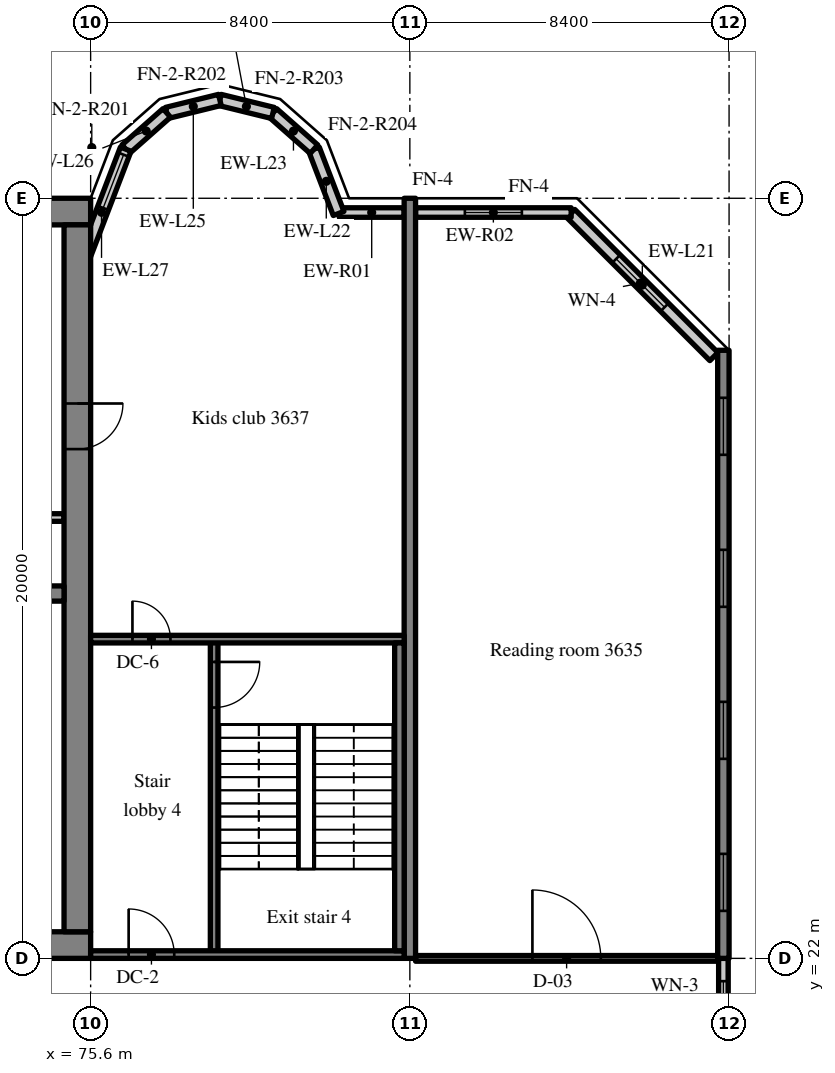
"""IFC4 building model, lengths in metres.
Left out: names, types, materials, properties, quantities, classifications, styles, units other than length and angle.
Written with IfcOpenShell. Run it as: python <this file> out.ifc"""

import sys

from ifc_helpers import new_model, si_unit, direction, frame, frame_2d, origin, place, context, subcontext, project, spatial, rectangle, extrude, source, transform, mapped, element, fill, save


model = new_model("IFC4")
c1 = context("Model", 3, precision=1e-05, world=origin(), true_north=direction((0.0, 1.0)))
c2 = subcontext(c1, "Body", "Model", "MODEL_VIEW")
j1 = project(units=[si_unit("LENGTHUNIT", "METRE"), si_unit("PLANEANGLEUNIT", "RADIAN")], contexts=[c1])
p1 = place(None, origin())
s1 = spatial("IfcSite", under=j1, at=p1, CompositionType="ELEMENT")
p2 = place(p1, origin())
s2 = spatial("IfcBuilding", under=s1, at=p2, CompositionType="ELEMENT")
p3 = place(p2, frame((0.0, 0.0, 151.6)))
s3 = spatial("IfcBuildingStorey", under=s2, at=p3, CompositionType="ELEMENT", Elevation=151.6)
m1 = source(origin(), c2, "Body", "SweptSolid", [
    extrude(rectangle(XDim=50.4, YDim=0.7, at=frame_2d((25.2, 0.0))), origin(), (0.0, 0.0, 1.0), 3.52),
])
p4 = place(p3, frame((25.2, 22.35, 0.0), z_axis=(0.0, 0.0, 1.0), x_axis=(1.0, 0.0, 0.0)))
e1 = element("IfcWall", 1, at=p4, inside=s3, PredefinedType="SHEAR", context=c2, shape_type="MappedRepresentation", body=[
    mapped(m1, transform((0.0, 0.0, 0.0), scale=1.0)),
])
m2 = source(origin(), c2, "Body", "SweptSolid", [
    extrude(rectangle(XDim=1.8, YDim=2.1, at=frame_2d((0.9, 1.05))), frame((0.0, 0.36, 0.0), z_axis=(0.0, -1.0, 0.0), x_axis=(1.0, 0.0, 0.0)), (0.0, 0.0, 1.0), 0.72),
])
p5 = place(p4, frame((15.9, 0.0, 0.0)))
e2 = element("IfcOpeningElement", 2, at=p5, cuts=e1, PredefinedType="OPENING", context=c2, shape_type="MappedRepresentation", body=[
    mapped(m2, transform((0.0, 0.0, 0.0), scale=1.0)),
])
m3 = source(origin(), c2, "Body", "SweptSolid", [
    extrude(rectangle(XDim=0.9, YDim=2.1, at=frame_2d((0.45, 1.05))), frame((0.0, 0.36, 0.0), z_axis=(0.0, -1.0, 0.0), x_axis=(1.0, 0.0, 0.0)), (0.0, 0.0, 1.0), 0.72),
])
p6 = place(p4, frame((21.5, 0.0, 0.0)))
e3 = element("IfcOpeningElement", 3, at=p6, cuts=e1, PredefinedType="OPENING", context=c2, shape_type="MappedRepresentation", body=[
    mapped(m3, transform((0.0, 0.0, 0.0), scale=1.0)),
])
p7 = place(p4, frame((32.7, 0.0, 0.0)))
e4 = element("IfcOpeningElement", 4, at=p7, cuts=e1, PredefinedType="OPENING", context=c2, shape_type="MappedRepresentation", body=[
    mapped(m2, transform((0.0, 0.0, 0.0), scale=1.0)),
])
m4 = source(origin(), c2, "Body", "SweptSolid", [
    extrude(rectangle(XDim=1.2, YDim=2.1, at=frame_2d((0.6, 1.05))), frame((0.0, 0.36, 0.0), z_axis=(0.0, -1.0, 0.0), x_axis=(1.0, 0.0, 0.0)), (0.0, 0.0, 1.0), 0.72),
])
p8 = place(p4, frame((6.475, 0.0, 0.0)))
e5 = element("IfcOpeningElement", 5, at=p8, cuts=e1, PredefinedType="OPENING", context=c2, shape_type="MappedRepresentation", body=[
    mapped(m4, transform((0.0, 0.0, 0.0), scale=1.0)),
])
p9 = place(p4, frame((47.875, 0.0, 0.0)))
e6 = element("IfcOpeningElement", 6, at=p9, cuts=e1, PredefinedType="OPENING", context=c2, shape_type="MappedRepresentation", body=[
    mapped(m4, transform((0.0, 0.0, 0.0), scale=1.0)),
])
p10 = place(p3, frame((25.2, 41.65, 0.0), z_axis=(0.0, 0.0, 1.0), x_axis=(1.0, 0.0, 0.0)))
e7 = element("IfcWall", 7, at=p10, inside=s3, PredefinedType="SHEAR", context=c2, shape_type="MappedRepresentation", body=[
    mapped(m1, transform((0.0, 0.0, 0.0), scale=1.0)),
])
m5 = source(origin(), c2, "Body", "SweptSolid", [
    extrude(rectangle(XDim=18.6, YDim=0.7, at=frame_2d((9.3, 0.0))), origin(), (0.0, 0.0, 1.0), 3.52),
])
p11 = place(p3, frame((75.25, 22.7, 0.0), z_axis=(0.0, 0.0, 1.0), x_axis=(0.0, 1.0, 0.0)))
e8 = element("IfcWall", 8, at=p11, inside=s3, PredefinedType="SHEAR", context=c2, shape_type="MappedRepresentation", body=[
    mapped(m5, transform((0.0, 0.0, 0.0), scale=1.0)),
])
p12 = place(p11, frame((12.7, 0.0, 0.0)))
e9 = element("IfcOpeningElement", 9, at=p12, cuts=e8, PredefinedType="OPENING", context=c2, shape_type="MappedRepresentation", body=[
    mapped(m4, transform((0.0, 0.0, 0.0), scale=1.0)),
])
m6 = source(origin(), c2, "Body", "SweptSolid", [
    extrude(rectangle(XDim=7.5, YDim=0.4, at=frame_2d((3.75, 0.0))), origin(), (0.0, 0.0, 1.0), 3.52),
])
p13 = place(p3, frame((67.4, 31.6, 0.0), z_axis=(0.0, 0.0, 1.0), x_axis=(1.0, 0.0, 0.0)))
e10 = element("IfcWall", 10, at=p13, inside=s3, PredefinedType="SHEAR", context=c2, shape_type="MappedRepresentation", body=[
    mapped(m6, transform((0.0, 0.0, 0.0), scale=1.0)),
])
m7 = source(origin(), c2, "Body", "SweptSolid", [
    extrude(rectangle(XDim=1.1, YDim=2.1, at=frame_2d((0.55, 1.05))), frame((0.0, 0.21, 0.0), z_axis=(0.0, -1.0, 0.0), x_axis=(1.0, 0.0, 0.0)), (0.0, 0.0, 1.0), 0.42),
])
p14 = place(p13, frame((5.725, 0.0, 0.0)))
e11 = element("IfcOpeningElement", 11, at=p14, cuts=e10, PredefinedType="OPENING", context=c2, shape_type="MappedRepresentation", body=[
    mapped(m7, transform((0.0, 0.0, 0.0), scale=1.0)),
])
m8 = source(origin(), c2, "Body", "SweptSolid", [
    extrude(rectangle(XDim=20.0, YDim=0.3, at=frame_2d((10.0, 0.0))), origin(), (0.0, 0.0, 1.0), 3.52),
])
p15 = place(p3, frame((84.0, 22.0, 0.0), z_axis=(0.0, 0.0, 1.0), x_axis=(0.0, 1.0, 0.0)))
e12 = element("IfcWall", 12, at=p15, inside=s3, PredefinedType="SHEAR", context=c2, shape_type="MappedRepresentation", body=[
    mapped(m8, transform((0.0, 0.0, 0.0), scale=1.0)),
])
m9 = source(origin(), c2, "Body", "SweptSolid", [
    extrude(rectangle(XDim=16.0, YDim=0.3, at=frame_2d((8.0, 0.0))), origin(), (0.0, 0.0, 1.0), 3.52),
])
p16 = place(p3, frame((92.25, 22.0, 0.0), z_axis=(0.0, 0.0, 1.0), x_axis=(0.0, 1.0, 0.0)))
e13 = element("IfcWall", 13, at=p16, inside=s3, PredefinedType="SHEAR", context=c2, shape_type="MappedRepresentation", body=[
    mapped(m9, transform((0.0, 0.0, 0.0), scale=1.0)),
])
m10 = source(origin(), c2, "Body", "SweptSolid", [
    extrude(rectangle(XDim=1.5, YDim=1.5, at=frame_2d((0.75, 0.75))), frame((0.0, 0.16, 0.0), z_axis=(0.0, -1.0, 0.0), x_axis=(1.0, 0.0, 0.0)), (0.0, 0.0, 1.0), 0.32),
])
p17 = place(p16, frame((1.25, 0.0, 0.9)))
e14 = element("IfcOpeningElement", 14, at=p17, cuts=e13, PredefinedType="OPENING", context=c2, shape_type="MappedRepresentation", body=[
    mapped(m10, transform((0.0, 0.0, 0.0), scale=1.0)),
])
p18 = place(p16, frame((5.25, 0.0, 0.9)))
e15 = element("IfcOpeningElement", 15, at=p18, cuts=e13, PredefinedType="OPENING", context=c2, shape_type="MappedRepresentation", body=[
    mapped(m10, transform((0.0, 0.0, 0.0), scale=1.0)),
])
p19 = place(p16, frame((9.25, 0.0, 0.9)))
e16 = element("IfcOpeningElement", 16, at=p19, cuts=e13, PredefinedType="OPENING", context=c2, shape_type="MappedRepresentation", body=[
    mapped(m10, transform((0.0, 0.0, 0.0), scale=1.0)),
])
p20 = place(p16, frame((13.25, 0.0, 0.9)))
e17 = element("IfcOpeningElement", 17, at=p20, cuts=e13, PredefinedType="OPENING", context=c2, shape_type="MappedRepresentation", body=[
    mapped(m10, transform((0.0, 0.0, 0.0), scale=1.0)),
])
m11 = source(origin(), c2, "Body", "SweptSolid", [
    extrude(rectangle(XDim=5.326, YDim=0.3, at=frame_2d((2.663, 0.0))), origin(), (0.0, 0.0, 1.0), 3.52),
])
p21 = place(p3, frame((92.0, 37.834, 0.0), z_axis=(0.0, 0.0, 1.0), x_axis=(-0.707083859269, 0.707129702361, 0.0)))
e18 = element("IfcWall", 18, at=p21, inside=s3, PredefinedType="SOLIDWALL", context=c2, shape_type="MappedRepresentation", body=[
    mapped(m11, transform((0.0, 0.0, 0.0), scale=1.0)),
])
m12 = source(origin(), c2, "Body", "SweptSolid", [
    extrude(rectangle(XDim=1.8, YDim=1.5, at=frame_2d((0.9, 0.75))), frame((0.0, 0.16, 0.0), z_axis=(0.0, -1.0, 0.0), x_axis=(1.0, 0.0, 0.0)), (0.0, 0.0, 1.0), 0.32),
])
p22 = place(p21, frame((1.836, 0.0, 0.9)))
e19 = element("IfcOpeningElement", 19, at=p22, cuts=e18, PredefinedType="OPENING", context=c2, shape_type="MappedRepresentation", body=[
    mapped(m12, transform((0.0, 0.0, 0.0), scale=1.0)),
])
m13 = source(origin(), c2, "Body", "SweptSolid", [
    extrude(rectangle(XDim=1.708, YDim=0.25, at=frame_2d((0.854, 0.0))), origin(), (0.0, 0.0, 1.0), 2.87),
])
p23 = place(p3, frame((83.85, 41.625, 0.0), z_axis=(0.0, 0.0, 1.0), x_axis=(-1.0, 0.0, 0.0)))
e20 = element("IfcWall", 20, at=p23, inside=s3, PredefinedType="SOLIDWALL", context=c2, shape_type="MappedRepresentation", body=[
    mapped(m13, transform((0.0, 0.0, 0.0), scale=1.0)),
])
m14 = source(origin(), c2, "Body", "SweptSolid", [
    extrude(rectangle(XDim=4.095, YDim=0.25, at=frame_2d((2.047, 0.0))), origin(), (0.0, 0.0, 1.0), 2.87),
])
p24 = place(p3, frame((88.245, 41.625, 0.0), z_axis=(0.0, 0.0, 1.0), x_axis=(-1.0, 0.0, 0.0)))
e21 = element("IfcWall", 21, at=p24, inside=s3, PredefinedType="SOLIDWALL", context=c2, shape_type="MappedRepresentation", body=[
    mapped(m14, transform((0.0, 0.0, 0.0), scale=1.0)),
])
m15 = source(origin(), c2, "Body", "SweptSolid", [
    extrude(rectangle(XDim=1.5, YDim=1.5, at=frame_2d((0.75, 0.75))), frame((0.0, 0.135, 0.0), z_axis=(0.0, -1.0, 0.0), x_axis=(1.0, 0.0, 0.0)), (0.0, 0.0, 1.0), 0.27),
])
p25 = place(p24, frame((1.297, 0.0, 0.9)))
e22 = element("IfcOpeningElement", 22, at=p25, cuts=e21, PredefinedType="OPENING", context=c2, shape_type="MappedRepresentation", body=[
    mapped(m15, transform((0.0, 0.0, 0.0), scale=1.0)),
])
m16 = source(origin(), c2, "Body", "SweptSolid", [
    extrude(rectangle(XDim=1.812, YDim=0.3, at=frame_2d((0.906, 0.0))), origin(), (0.0, 0.0, 1.0), 3.52),
])
p26 = place(p3, frame((82.125, 41.6, 0.0), z_axis=(0.0, 0.0, 1.0), x_axis=(-0.357877270961, 0.93376863244, 0.0)))
e23 = element("IfcWall", 23, at=p26, inside=s3, PredefinedType="SOLIDWALL", context=c2, shape_type="MappedRepresentation", body=[
    mapped(m16, transform((0.0, 0.0, 0.0), scale=1.0)),
])
m17 = source(origin(), c2, "Body", "SweptSolid", [
    extrude(rectangle(XDim=1.44, YDim=0.3, at=frame_2d((0.72, 0.0))), origin(), (0.0, 0.0, 1.0), 3.52),
])
p27 = place(p3, frame((81.477, 43.292, 0.0), z_axis=(0.0, 0.0, 1.0), x_axis=(-0.74957555648, 0.661918790432, 0.0)))
e24 = element("IfcWall", 24, at=p27, inside=s3, PredefinedType="SOLIDWALL", context=c2, shape_type="MappedRepresentation", body=[
    mapped(m17, transform((0.0, 0.0, 0.0), scale=1.0)),
])
m18 = source(origin(), c2, "Body", "SweptSolid", [
    extrude(rectangle(XDim=1.439, YDim=0.3, at=frame_2d((0.719, 0.0))), origin(), (0.0, 0.0, 1.0), 3.52),
])
for number, where, z_axis, x_axis in (
    (25, (80.397, 44.245, 0.0), (0.0, 0.0, 1.0), (-0.971, 0.238, 0.0)),
    (26, (79.0, 44.588, 0.0), (0.0, 0.0, 1.0), (-0.971, -0.238, 0.0)),
):
    element("IfcWall", number, at=place(p3, frame(where, z_axis=z_axis, x_axis=x_axis)), inside=s3, PredefinedType="SOLIDWALL", context=c2, shape_type="MappedRepresentation", body=[
        mapped(m18, transform((0.0, 0.0, 0.0), scale=1.0)),
    ])
p28 = place(p3, frame((77.603, 44.245, 0.0), z_axis=(0.0, 0.0, 1.0), x_axis=(-0.74957555648, -0.661918790432, 0.0)))
e27 = element("IfcWall", 27, at=p28, inside=s3, PredefinedType="SOLIDWALL", context=c2, shape_type="MappedRepresentation", body=[
    mapped(m17, transform((0.0, 0.0, 0.0), scale=1.0)),
])
m19 = source(origin(), c2, "Body", "SweptSolid", [
    extrude(rectangle(XDim=3.559, YDim=0.3, at=frame_2d((1.78, 0.0))), origin(), (0.0, 0.0, 1.0), 3.52),
])
p29 = place(p3, frame((76.523, 43.292, 0.0), z_axis=(0.0, 0.0, 1.0), x_axis=(-0.35779745313, -0.933799219604, 0.0)))
e28 = element("IfcWall", 28, at=p29, inside=s3, PredefinedType="SOLIDWALL", context=c2, shape_type="MappedRepresentation", body=[
    mapped(m19, transform((0.0, 0.0, 0.0), scale=1.0)),
])
m20 = source(origin(), c2, "Body", "SweptSolid", [
    extrude(rectangle(XDim=1.5, YDim=2.0, at=frame_2d((0.75, 1.0))), frame((0.0, 0.16, 0.0), z_axis=(0.0, -1.0, 0.0), x_axis=(1.0, 0.0, 0.0)), (0.0, 0.0, 1.0), 0.32),
])
p30 = place(p29, frame((0.156, 0.0, 0.9)))
e29 = element("IfcOpeningElement", 29, at=p30, cuts=e28, PredefinedType="OPENING", context=c2, shape_type="MappedRepresentation", body=[
    mapped(m20, transform((0.0, 0.0, 0.0), scale=1.0)),
])
m21 = source(origin(), c2, "Body", "SweptSolid", [
    extrude(rectangle(XDim=2.4, YDim=0.25, at=frame_2d((1.2, 0.0))), origin(), (0.0, 0.0, 1.0), 2.62),
])
p31 = place(p3, frame((92.25, 19.6, 0.0), z_axis=(0.0, 0.0, 1.0), x_axis=(0.0, 1.0, 0.0)))
e30 = element("IfcWall", 30, at=p31, inside=s3, PredefinedType="SOLIDWALL", context=c2, shape_type="MappedRepresentation", body=[
    mapped(m21, transform((0.0, 0.0, 0.0), scale=1.0)),
])
m22 = source(origin(), c2, "Body", "SweptSolid", [
    extrude(rectangle(XDim=1.2, YDim=1.5, at=frame_2d((0.6, 0.75))), frame((0.0, 0.135, 0.0), z_axis=(0.0, -1.0, 0.0), x_axis=(1.0, 0.0, 0.0)), (0.0, 0.0, 1.0), 0.27),
])
p32 = place(p31, frame((0.6, 0.0, 0.9)))
e31 = element("IfcOpeningElement", 31, at=p32, cuts=e30, PredefinedType="OPENING", context=c2, shape_type="MappedRepresentation", body=[
    mapped(m22, transform((0.0, 0.0, 0.0), scale=1.0)),
])
m23 = source(origin(), c2, "Body", "SweptSolid", [
    extrude(rectangle(XDim=2.45, YDim=0.2, at=frame_2d((1.225, 0.0))), origin(), (0.0, 0.0, 1.0), 3.52),
])
p33 = place(p3, frame((72.45, 33.6, 0.0), z_axis=(0.0, 0.0, 1.0), x_axis=(1.0, 0.0, 0.0)))
e32 = element("IfcWall", 32, at=p33, inside=s3, PredefinedType="SOLIDWALL", context=c2, shape_type="MappedRepresentation", body=[
    mapped(m23, transform((0.0, 0.0, 0.0), scale=1.0)),
])
m24 = source(origin(), c2, "Body", "SweptSolid", [
    extrude(rectangle(XDim=8.3, YDim=0.2, at=frame_2d((4.15, 0.0))), origin(), (0.0, 0.0, 1.0), 3.52),
])
p34 = place(p3, frame((78.85, 22.1, 0.0), z_axis=(0.0, 0.0, 1.0), x_axis=(0.0, 1.0, 0.0)))
e33 = element("IfcWall", 33, at=p34, inside=s3, PredefinedType="SOLIDWALL", context=c2, shape_type="MappedRepresentation", body=[
    mapped(m24, transform((0.0, 0.0, 0.0), scale=1.0)),
])
m25 = source(origin(), c2, "Body", "SweptSolid", [
    extrude(rectangle(XDim=1.2, YDim=2.1, at=frame_2d((0.6, 1.05))), frame((0.0, 0.11, 0.0), z_axis=(0.0, -1.0, 0.0), x_axis=(1.0, 0.0, 0.0)), (0.0, 0.0, 1.0), 0.22),
])
p35 = place(p34, frame((6.5, 0.0, 0.0)))
e34 = element("IfcOpeningElement", 34, at=p35, cuts=e33, PredefinedType="OPENING", context=c2, shape_type="MappedRepresentation", body=[
    mapped(m25, transform((0.0, 0.0, 0.0), scale=1.0)),
])
m26 = source(origin(), c2, "Body", "SweptSolid", [
    extrude(rectangle(XDim=8.25, YDim=0.2, at=frame_2d((4.125, 0.0))), origin(), (0.0, 0.0, 1.0), 3.52),
])
p36 = place(p3, frame((83.85, 22.1, 0.0), z_axis=(0.0, 0.0, 1.0), x_axis=(-1.0, 0.0, 0.0)))
e35 = element("IfcWall", 35, at=p36, inside=s3, PredefinedType="SOLIDWALL", context=c2, shape_type="MappedRepresentation", body=[
    mapped(m26, transform((0.0, 0.0, 0.0), scale=1.0)),
])
p37 = place(p36, frame((6.05, 0.0, 0.0)))
e36 = element("IfcOpeningElement", 36, at=p37, cuts=e35, PredefinedType="OPENING", context=c2, shape_type="MappedRepresentation", body=[
    mapped(m25, transform((0.0, 0.0, 0.0), scale=1.0)),
])
p38 = place(p3, frame((83.85, 30.4, 0.0), z_axis=(0.0, 0.0, 1.0), x_axis=(-1.0, 0.0, 0.0)))
e37 = element("IfcWall", 37, at=p38, inside=s3, PredefinedType="SOLIDWALL", context=c2, shape_type="MappedRepresentation", body=[
    mapped(m26, transform((0.0, 0.0, 0.0), scale=1.0)),
])
m27 = source(origin(), c2, "Body", "SweptSolid", [
    extrude(rectangle(XDim=1.0, YDim=2.1, at=frame_2d((0.5, 1.05))), frame((0.0, 0.11, 0.0), z_axis=(0.0, -1.0, 0.0), x_axis=(1.0, 0.0, 0.0)), (0.0, 0.0, 1.0), 0.22),
])
p39 = place(p38, frame((6.15, 0.0, 0.0)))
e38 = element("IfcOpeningElement", 38, at=p39, cuts=e37, PredefinedType="OPENING", context=c2, shape_type="MappedRepresentation", body=[
    mapped(m27, transform((0.0, 0.0, 0.0), scale=1.0)),
])
m28 = source(origin(), c2, "Body", "SweptSolid", [
    extrude(rectangle(XDim=8.1, YDim=0.25, at=frame_2d((4.05, 0.0))), origin(), (0.0, 0.0, 1.0), 3.52),
])
p40 = place(p3, frame((83.725, 22.2, 0.0), z_axis=(0.0, 0.0, 1.0), x_axis=(0.0, 1.0, 0.0)))
e39 = element("IfcWall", 39, at=p40, inside=s3, PredefinedType="SOLIDWALL", context=c2, shape_type="MappedRepresentation", body=[
    mapped(m28, transform((0.0, 0.0, 0.0), scale=1.0)),
])
m29 = source(origin(), c2, "Body", "SweptSolid", [
    extrude(rectangle(XDim=7.95, YDim=0.15, at=frame_2d((3.975, 0.0))), origin(), (0.0, 0.0, 1.0), 2.82),
])
p41 = place(p3, frame((84.15, 22.0, 0.0), z_axis=(0.0, 0.0, 1.0), x_axis=(1.0, 0.0, 0.0)))
e40 = element("IfcWall", 40, at=p41, inside=s3, PredefinedType="PARTITIONING", context=c2, shape_type="MappedRepresentation", body=[
    mapped(m29, transform((0.0, 0.0, 0.0), scale=1.0)),
])
m30 = source(origin(), c2, "Body", "SweptSolid", [
    extrude(rectangle(XDim=1.8, YDim=2.1, at=frame_2d((0.9, 1.05))), frame((0.0, 0.085, 0.0), z_axis=(0.0, -1.0, 0.0), x_axis=(1.0, 0.0, 0.0)), (0.0, 0.0, 1.0), 0.17),
])
p42 = place(p41, frame((3.075, 0.0, 0.0)))
e41 = element("IfcOpeningElement", 41, at=p42, cuts=e40, PredefinedType="OPENING", context=c2, shape_type="MappedRepresentation", body=[
    mapped(m30, transform((0.0, 0.0, 0.0), scale=1.0)),
])
m31 = source(origin(), c2, "Body", "SweptSolid", [
    extrude(rectangle(XDim=1.8, YDim=1.5, at=frame_2d((0.9, 0.75))), frame((0.0, 0.03, 0.0), z_axis=(0.0, -1.0, 0.0), x_axis=(1.0, 0.0, 0.0)), (0.0, 0.0, 1.0), 0.06),
])
p43 = place(p22, origin())
e42 = element("IfcWindow", 42, at=p43, inside=s3, PartitioningType="SINGLE_PANEL", PredefinedType="WINDOW", context=c2, shape_type="MappedRepresentation", body=[
    mapped(m31, transform((0.0, 0.0, 0.0), scale=1.0)),
])
fill(e19, e42)
m32 = source(origin(), c2, "Body", "SweptSolid", [
    extrude(rectangle(XDim=1.5, YDim=1.5, at=frame_2d((0.75, 0.75))), frame((0.0, 0.03, 0.0), z_axis=(0.0, -1.0, 0.0), x_axis=(1.0, 0.0, 0.0)), (0.0, 0.0, 1.0), 0.06),
])
p44 = place(p25, origin())
e43 = element("IfcWindow", 43, at=p44, inside=s3, PartitioningType="SINGLE_PANEL", PredefinedType="WINDOW", context=c2, shape_type="MappedRepresentation", body=[
    mapped(m32, transform((0.0, 0.0, 0.0), scale=1.0)),
])
fill(e22, e43)
m33 = source(origin(), c2, "Body", "SweptSolid", [
    extrude(rectangle(XDim=1.5, YDim=2.0, at=frame_2d((0.75, 1.0))), frame((0.0, 0.03, 0.0), z_axis=(0.0, -1.0, 0.0), x_axis=(1.0, 0.0, 0.0)), (0.0, 0.0, 1.0), 0.06),
])
p45 = place(p30, origin())
e44 = element("IfcWindow", 44, at=p45, inside=s3, PartitioningType="SINGLE_PANEL", PredefinedType="WINDOW", context=c2, shape_type="MappedRepresentation", body=[
    mapped(m33, transform((0.0, 0.0, 0.0), scale=1.0)),
])
fill(e29, e44)
p46 = place(p17, origin())
e45 = element("IfcWindow", 45, at=p46, inside=s3, PartitioningType="SINGLE_PANEL", PredefinedType="WINDOW", context=c2, shape_type="MappedRepresentation", body=[
    mapped(m32, transform((0.0, 0.0, 0.0), scale=1.0)),
])
fill(e14, e45)
p47 = place(p18, origin())
e46 = element("IfcWindow", 46, at=p47, inside=s3, PartitioningType="SINGLE_PANEL", PredefinedType="WINDOW", context=c2, shape_type="MappedRepresentation", body=[
    mapped(m32, transform((0.0, 0.0, 0.0), scale=1.0)),
])
fill(e15, e46)
p48 = place(p19, origin())
e47 = element("IfcWindow", 47, at=p48, inside=s3, PartitioningType="SINGLE_PANEL", PredefinedType="WINDOW", context=c2, shape_type="MappedRepresentation", body=[
    mapped(m32, transform((0.0, 0.0, 0.0), scale=1.0)),
])
fill(e16, e47)
p49 = place(p20, origin())
e48 = element("IfcWindow", 48, at=p49, inside=s3, PartitioningType="SINGLE_PANEL", PredefinedType="WINDOW", context=c2, shape_type="MappedRepresentation", body=[
    mapped(m32, transform((0.0, 0.0, 0.0), scale=1.0)),
])
fill(e17, e48)
m34 = source(origin(), c2, "Body", "SweptSolid", [
    extrude(rectangle(XDim=1.2, YDim=1.5, at=frame_2d((0.6, 0.75))), frame((0.0, 0.03, 0.0), z_axis=(0.0, -1.0, 0.0), x_axis=(1.0, 0.0, 0.0)), (0.0, 0.0, 1.0), 0.06),
])
p50 = place(p32, origin())
e49 = element("IfcWindow", 49, at=p50, inside=s3, PartitioningType="SINGLE_PANEL", PredefinedType="WINDOW", context=c2, shape_type="MappedRepresentation", body=[
    mapped(m34, transform((0.0, 0.0, 0.0), scale=1.0)),
])
fill(e31, e49)
m35 = source(origin(), c2, "Body", "SweptSolid", [
    extrude(rectangle(XDim=1.2, YDim=2.1, at=frame_2d((0.6, 1.05))), frame((0.0, 0.025, 0.0), z_axis=(0.0, -1.0, 0.0), x_axis=(1.0, 0.0, 0.0)), (0.0, 0.0, 1.0), 0.05),
])
p51 = place(p12, origin())
e50 = element("IfcDoor", 50, at=p51, inside=s3, OperationType="SINGLE_SWING_RIGHT", PredefinedType="DOOR", context=c2, shape_type="MappedRepresentation", body=[
    mapped(m35, transform((0.0, 0.0, 0.0), scale=1.0)),
])
fill(e9, e50)
p52 = place(p35, origin())
e51 = element("IfcDoor", 51, at=p52, inside=s3, OperationType="SINGLE_SWING_RIGHT", PredefinedType="DOOR", context=c2, shape_type="MappedRepresentation", body=[
    mapped(m35, transform((0.0, 0.0, 0.0), scale=1.0)),
])
fill(e34, e51)
p53 = place(p37, origin())
e52 = element("IfcDoor", 52, at=p53, inside=s3, OperationType="SINGLE_SWING_RIGHT", PredefinedType="DOOR", context=c2, shape_type="MappedRepresentation", body=[
    mapped(m35, transform((0.0, 0.0, 0.0), scale=1.0)),
])
fill(e36, e52)
m36 = source(origin(), c2, "Body", "SweptSolid", [
    extrude(rectangle(XDim=1.0, YDim=2.1, at=frame_2d((0.5, 1.05))), frame((0.0, 0.025, 0.0), z_axis=(0.0, -1.0, 0.0), x_axis=(1.0, 0.0, 0.0)), (0.0, 0.0, 1.0), 0.05),
])
p54 = place(p39, origin())
e53 = element("IfcDoor", 53, at=p54, inside=s3, OperationType="SINGLE_SWING_RIGHT", PredefinedType="DOOR", context=c2, shape_type="MappedRepresentation", body=[
    mapped(m36, transform((0.0, 0.0, 0.0), scale=1.0)),
])
fill(e38, e53)
m37 = source(origin(), c2, "Body", "SweptSolid", [
    extrude(rectangle(XDim=1.8, YDim=2.1, at=frame_2d((0.9, 1.05))), frame((0.0, 0.025, 0.0), z_axis=(0.0, -1.0, 0.0), x_axis=(1.0, 0.0, 0.0)), (0.0, 0.0, 1.0), 0.05),
])
p55 = place(p42, origin())
e54 = element("IfcDoor", 54, at=p55, inside=s3, OperationType="DOUBLE_DOOR_SINGLE_SWING", PredefinedType="DOOR", context=c2, shape_type="MappedRepresentation", body=[
    mapped(m37, transform((0.0, 0.0, 0.0), scale=1.0)),
])
fill(e41, e54)
save(model, sys.argv[1])
